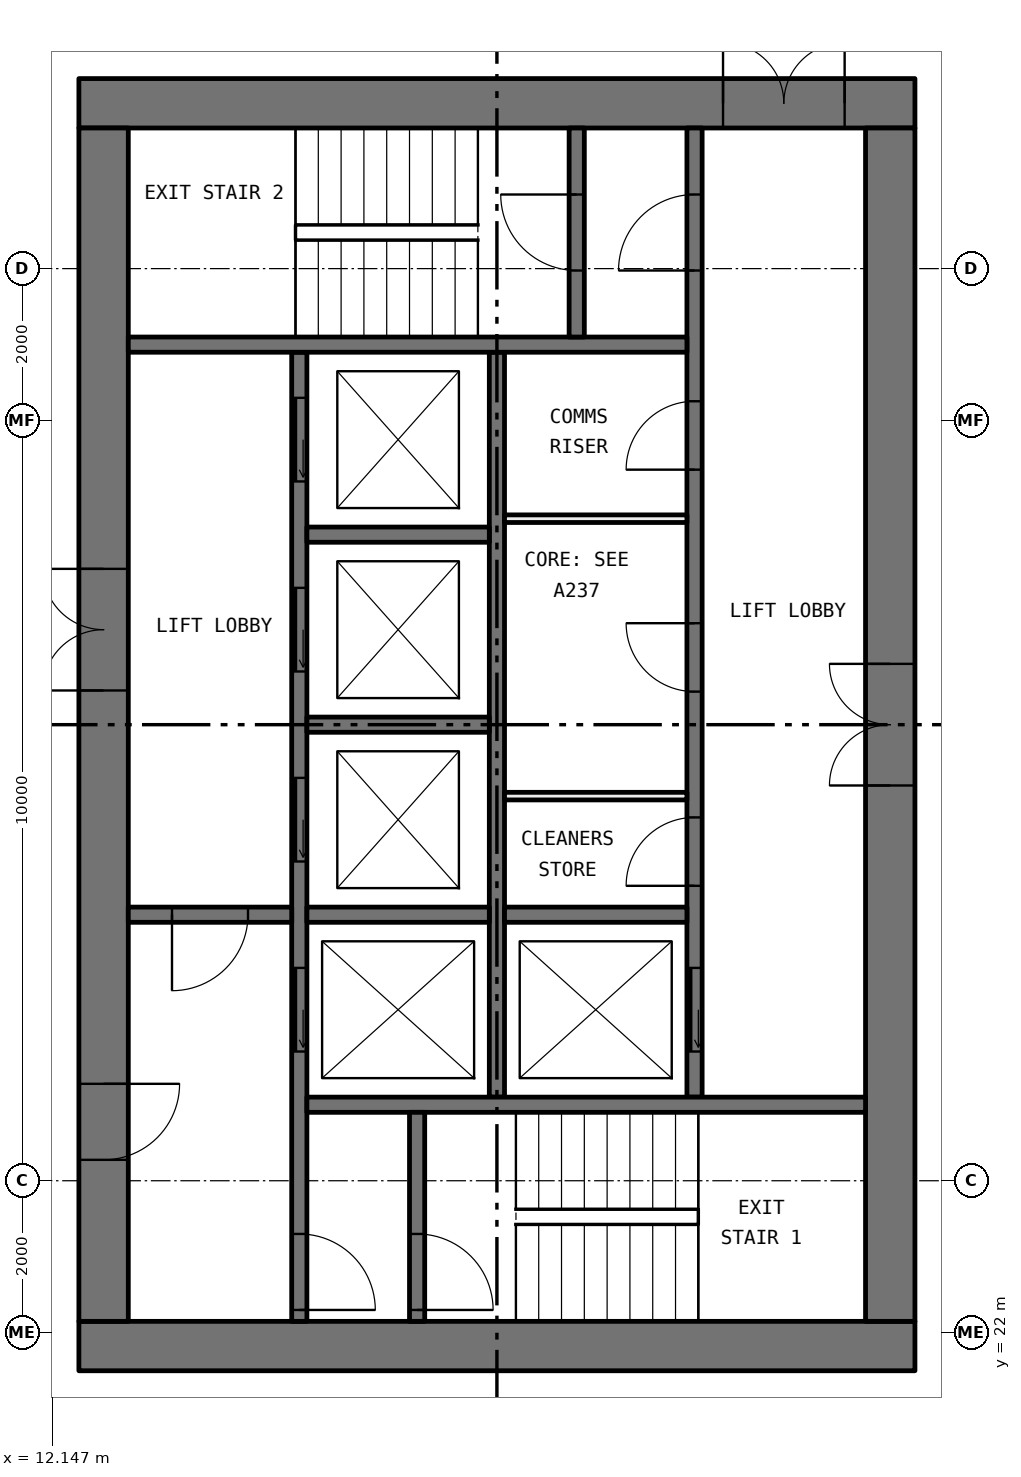
"""IFC4 building model, lengths in metres.
Left out: names, types, materials, properties, quantities, classifications, styles, units other than length and angle.
Written with IfcOpenShell. Run it as: python <this file> out.ifc"""

import sys

from ifc_helpers import new_model, si_unit, direction, frame, frame_2d, origin, place, context, subcontext, project, spatial, rectangle, extrude, element, fill, save


model = new_model("IFC4")
c1 = context("Model", 3, precision=1e-05, world=origin(), true_north=direction((0.0, 1.0)))
c2 = subcontext(c1, "Body", "Model", "MODEL_VIEW")
j1 = project(units=[si_unit("LENGTHUNIT", "METRE"), si_unit("PLANEANGLEUNIT", "RADIAN")], contexts=[c1])
p1 = place(None, origin())
s1 = spatial("IfcSite", under=j1, at=p1, CompositionType="ELEMENT")
p2 = place(p1, origin())
s2 = spatial("IfcBuilding", under=s1, at=p2, CompositionType="ELEMENT")
p3 = place(p2, frame((0.0, 0.0, 138.0)))
s3 = spatial("IfcBuildingStorey", under=s2, at=p3, CompositionType="ELEMENT", Elevation=138.0)
p4 = place(p3, frame((12.5, 21.825, 0.0), z_axis=(0.0, 0.0, 1.0), x_axis=(1.0, 0.0, 0.0)))
e1 = element("IfcWall", 1, at=p4, inside=s3, PredefinedType="SHEAR", context=c2, shape_type="SweptSolid", body=[
    extrude(rectangle(XDim=11.0, YDim=0.65, at=frame_2d((5.5, 0.0))), origin(), (0.0, 0.0, 1.0), 3.05),
])
p5 = place(p3, frame((12.5, 38.175, 0.0), z_axis=(0.0, 0.0, 1.0), x_axis=(1.0, 0.0, 0.0)))
e2 = element("IfcWall", 2, at=p5, inside=s3, PredefinedType="SHEAR", context=c2, shape_type="SweptSolid", body=[
    extrude(rectangle(XDim=11.0, YDim=0.65, at=frame_2d((5.5, 0.0))), origin(), (0.0, 0.0, 1.0), 3.05),
])
p6 = place(p5, frame((8.475, 0.0, 0.0)))
e3 = element("IfcOpeningElement", 3, at=p6, cuts=e2, PredefinedType="OPENING", context=c2, shape_type="SweptSolid", body=[
    extrude(rectangle(XDim=1.6, YDim=2.1, at=frame_2d((0.8, 1.05))), frame((0.0, 0.335, 0.0), z_axis=(0.0, -1.0, 0.0), x_axis=(1.0, 0.0, 0.0)), (0.0, 0.0, 1.0), 0.67),
])
p7 = place(p3, frame((12.825, 22.15, 0.0), z_axis=(0.0, 0.0, 1.0), x_axis=(0.0, 1.0, 0.0)))
e4 = element("IfcWall", 4, at=p7, inside=s3, PredefinedType="SHEAR", context=c2, shape_type="SweptSolid", body=[
    extrude(rectangle(XDim=15.7, YDim=0.65, at=frame_2d((7.85, 0.0))), origin(), (0.0, 0.0, 1.0), 3.05),
])
p8 = place(p7, frame((8.3, 0.0, 0.0)))
e5 = element("IfcOpeningElement", 5, at=p8, cuts=e4, PredefinedType="OPENING", context=c2, shape_type="SweptSolid", body=[
    extrude(rectangle(XDim=1.6, YDim=2.1, at=frame_2d((0.8, 1.05))), frame((0.0, 0.335, 0.0), z_axis=(0.0, -1.0, 0.0), x_axis=(1.0, 0.0, 0.0)), (0.0, 0.0, 1.0), 0.67),
])
p9 = place(p7, frame((2.125, 0.0, 0.0)))
e6 = element("IfcOpeningElement", 6, at=p9, cuts=e4, PredefinedType="OPENING", context=c2, shape_type="SweptSolid", body=[
    extrude(rectangle(XDim=1.0, YDim=2.1, at=frame_2d((0.5, 1.05))), frame((0.0, 0.335, 0.0), z_axis=(0.0, -1.0, 0.0), x_axis=(1.0, 0.0, 0.0)), (0.0, 0.0, 1.0), 0.67),
])
p10 = place(p3, frame((23.175, 22.15, 0.0), z_axis=(0.0, 0.0, 1.0), x_axis=(0.0, 1.0, 0.0)))
e7 = element("IfcWall", 7, at=p10, inside=s3, PredefinedType="SHEAR", context=c2, shape_type="SweptSolid", body=[
    extrude(rectangle(XDim=15.7, YDim=0.65, at=frame_2d((7.85, 0.0))), origin(), (0.0, 0.0, 1.0), 3.05),
])
p11 = place(p10, frame((7.05, 0.0, 0.0)))
e8 = element("IfcOpeningElement", 8, at=p11, cuts=e7, PredefinedType="OPENING", context=c2, shape_type="SweptSolid", body=[
    extrude(rectangle(XDim=1.6, YDim=2.1, at=frame_2d((0.8, 1.05))), frame((0.0, 0.335, 0.0), z_axis=(0.0, -1.0, 0.0), x_axis=(1.0, 0.0, 0.0)), (0.0, 0.0, 1.0), 0.67),
])
p12 = place(p3, frame((15.4, 22.15, 0.0), z_axis=(0.0, 0.0, 1.0), x_axis=(0.0, 1.0, 0.0)))
e9 = element("IfcWall", 9, at=p12, inside=s3, PredefinedType="SOLIDWALL", context=c2, shape_type="SweptSolid", body=[
    extrude(rectangle(XDim=12.75, YDim=0.2, at=frame_2d((6.375, 0.0))), origin(), (0.0, 0.0, 1.0), 3.05),
])
p13 = place(p12, frame((3.55, 0.0, 0.0)))
e10 = element("IfcOpeningElement", 10, at=p13, cuts=e9, PredefinedType="OPENING", context=c2, shape_type="SweptSolid", body=[
    extrude(rectangle(XDim=1.1, YDim=2.1, at=frame_2d((0.55, 1.05))), frame((0.0, 0.11, 0.0), z_axis=(0.0, -1.0, 0.0), x_axis=(1.0, 0.0, 0.0)), (0.0, 0.0, 1.0), 0.22),
])
p14 = place(p12, frame((6.05, 0.0, 0.0)))
e11 = element("IfcOpeningElement", 11, at=p14, cuts=e9, PredefinedType="OPENING", context=c2, shape_type="SweptSolid", body=[
    extrude(rectangle(XDim=1.1, YDim=2.1, at=frame_2d((0.55, 1.05))), frame((0.0, 0.11, 0.0), z_axis=(0.0, -1.0, 0.0), x_axis=(1.0, 0.0, 0.0)), (0.0, 0.0, 1.0), 0.22),
])
p15 = place(p12, frame((8.55, 0.0, 0.0)))
e12 = element("IfcOpeningElement", 12, at=p15, cuts=e9, PredefinedType="OPENING", context=c2, shape_type="SweptSolid", body=[
    extrude(rectangle(XDim=1.1, YDim=2.1, at=frame_2d((0.55, 1.05))), frame((0.0, 0.11, 0.0), z_axis=(0.0, -1.0, 0.0), x_axis=(1.0, 0.0, 0.0)), (0.0, 0.0, 1.0), 0.22),
])
p16 = place(p12, frame((11.05, 0.0, 0.0)))
e13 = element("IfcOpeningElement", 13, at=p16, cuts=e9, PredefinedType="OPENING", context=c2, shape_type="SweptSolid", body=[
    extrude(rectangle(XDim=1.1, YDim=2.1, at=frame_2d((0.55, 1.05))), frame((0.0, 0.11, 0.0), z_axis=(0.0, -1.0, 0.0), x_axis=(1.0, 0.0, 0.0)), (0.0, 0.0, 1.0), 0.22),
])
p17 = place(p12, frame((0.15, 0.0, 0.0)))
e14 = element("IfcOpeningElement", 14, at=p17, cuts=e9, PredefinedType="OPENING", context=c2, shape_type="SweptSolid", body=[
    extrude(rectangle(XDim=1.0, YDim=2.1, at=frame_2d((0.5, 1.05))), frame((0.0, 0.11, 0.0), z_axis=(0.0, -1.0, 0.0), x_axis=(1.0, 0.0, 0.0)), (0.0, 0.0, 1.0), 0.22),
])
p18 = place(p3, frame((20.6, 25.1, 0.0), z_axis=(0.0, 0.0, 1.0), x_axis=(0.0, 1.0, 0.0)))
e15 = element("IfcWall", 15, at=p18, inside=s3, PredefinedType="SOLIDWALL", context=c2, shape_type="SweptSolid", body=[
    extrude(rectangle(XDim=12.75, YDim=0.2, at=frame_2d((6.375, 0.0))), origin(), (0.0, 0.0, 1.0), 3.05),
])
p19 = place(p18, frame((0.6, 0.0, 0.0)))
e16 = element("IfcOpeningElement", 16, at=p19, cuts=e15, PredefinedType="OPENING", context=c2, shape_type="SweptSolid", body=[
    extrude(rectangle(XDim=1.1, YDim=2.1, at=frame_2d((0.55, 1.05))), frame((0.0, 0.11, 0.0), z_axis=(0.0, -1.0, 0.0), x_axis=(1.0, 0.0, 0.0)), (0.0, 0.0, 1.0), 0.22),
])
p20 = place(p18, frame((10.875, 0.0, 0.0)))
e17 = element("IfcOpeningElement", 17, at=p20, cuts=e15, PredefinedType="OPENING", context=c2, shape_type="SweptSolid", body=[
    extrude(rectangle(XDim=1.0, YDim=2.1, at=frame_2d((0.5, 1.05))), frame((0.0, 0.11, 0.0), z_axis=(0.0, -1.0, 0.0), x_axis=(1.0, 0.0, 0.0)), (0.0, 0.0, 1.0), 0.22),
])
p21 = place(p18, frame((2.78, 0.0, 0.0)))
e18 = element("IfcOpeningElement", 18, at=p21, cuts=e15, PredefinedType="OPENING", context=c2, shape_type="SweptSolid", body=[
    extrude(rectangle(XDim=0.9, YDim=2.1, at=frame_2d((0.45, 1.05))), frame((0.0, 0.11, 0.0), z_axis=(0.0, -1.0, 0.0), x_axis=(1.0, 0.0, 0.0)), (0.0, 0.0, 1.0), 0.22),
])
p22 = place(p18, frame((5.335, 0.0, 0.0)))
e19 = element("IfcOpeningElement", 19, at=p22, cuts=e15, PredefinedType="OPENING", context=c2, shape_type="SweptSolid", body=[
    extrude(rectangle(XDim=0.9, YDim=2.1, at=frame_2d((0.45, 1.05))), frame((0.0, 0.11, 0.0), z_axis=(0.0, -1.0, 0.0), x_axis=(1.0, 0.0, 0.0)), (0.0, 0.0, 1.0), 0.22),
])
p23 = place(p18, frame((8.255, 0.0, 0.0)))
e20 = element("IfcOpeningElement", 20, at=p23, cuts=e15, PredefinedType="OPENING", context=c2, shape_type="SweptSolid", body=[
    extrude(rectangle(XDim=0.9, YDim=2.1, at=frame_2d((0.45, 1.05))), frame((0.0, 0.11, 0.0), z_axis=(0.0, -1.0, 0.0), x_axis=(1.0, 0.0, 0.0)), (0.0, 0.0, 1.0), 0.22),
])
p24 = place(p3, frame((18.0, 25.1, 0.0), z_axis=(0.0, 0.0, 1.0), x_axis=(0.0, 1.0, 0.0)))
e21 = element("IfcWall", 21, at=p24, inside=s3, PredefinedType="SOLIDWALL", context=c2, shape_type="SweptSolid", body=[
    extrude(rectangle(XDim=9.8, YDim=0.2, at=frame_2d((4.9, 0.0))), origin(), (0.0, 0.0, 1.0), 3.05),
])
for number, where, z_axis, x_axis in (
    (22, (15.5, 25.0, 0.0), (0.0, 0.0, 1.0), (1.0, 0.0, 0.0)),
    (23, (13.15, 35.0, 0.0), (0.0, 0.0, 1.0), (1.0, 0.0, 0.0)),
):
    element("IfcWall", number, at=place(p3, frame(where, z_axis=z_axis, x_axis=x_axis)), inside=s3, PredefinedType="SOLIDWALL", context=c2, shape_type="SweptSolid", body=[
        extrude(rectangle(XDim=7.35, YDim=0.2, at=frame_2d((3.675, 0.0))), origin(), (0.0, 0.0, 1.0), 3.05),
    ])
p25 = place(p3, frame((13.15, 27.5, 0.0), z_axis=(0.0, 0.0, 1.0), x_axis=(1.0, 0.0, 0.0)))
e24 = element("IfcWall", 24, at=p25, inside=s3, PredefinedType="SOLIDWALL", context=c2, shape_type="SweptSolid", body=[
    extrude(rectangle(XDim=2.15, YDim=0.2, at=frame_2d((1.075, 0.0))), origin(), (0.0, 0.0, 1.0), 3.05),
])
p26 = place(p25, frame((0.575, 0.0, 0.0)))
e25 = element("IfcOpeningElement", 25, at=p26, cuts=e24, PredefinedType="OPENING", context=c2, shape_type="SweptSolid", body=[
    extrude(rectangle(XDim=1.0, YDim=2.1, at=frame_2d((0.5, 1.05))), frame((0.0, 0.11, 0.0), z_axis=(0.0, -1.0, 0.0), x_axis=(1.0, 0.0, 0.0)), (0.0, 0.0, 1.0), 0.22),
])
p27 = place(p3, frame((16.95, 22.15, 0.0), z_axis=(0.0, 0.0, 1.0), x_axis=(0.0, 1.0, 0.0)))
e26 = element("IfcWall", 26, at=p27, inside=s3, PredefinedType="SOLIDWALL", context=c2, shape_type="SweptSolid", body=[
    extrude(rectangle(XDim=2.75, YDim=0.2, at=frame_2d((1.375, 0.0))), origin(), (0.0, 0.0, 1.0), 3.05),
])
p28 = place(p27, frame((0.15, 0.0, 0.0)))
e27 = element("IfcOpeningElement", 27, at=p28, cuts=e26, PredefinedType="OPENING", context=c2, shape_type="SweptSolid", body=[
    extrude(rectangle(XDim=1.0, YDim=2.1, at=frame_2d((0.5, 1.05))), frame((0.0, 0.11, 0.0), z_axis=(0.0, -1.0, 0.0), x_axis=(1.0, 0.0, 0.0)), (0.0, 0.0, 1.0), 0.22),
])
p29 = place(p3, frame((19.05, 35.1, 0.0), z_axis=(0.0, 0.0, 1.0), x_axis=(0.0, 1.0, 0.0)))
e28 = element("IfcWall", 28, at=p29, inside=s3, PredefinedType="SOLIDWALL", context=c2, shape_type="SweptSolid", body=[
    extrude(rectangle(XDim=2.75, YDim=0.2, at=frame_2d((1.375, 0.0))), origin(), (0.0, 0.0, 1.0), 3.05),
])
p30 = place(p29, frame((0.875, 0.0, 0.0)))
e29 = element("IfcOpeningElement", 29, at=p30, cuts=e28, PredefinedType="OPENING", context=c2, shape_type="SweptSolid", body=[
    extrude(rectangle(XDim=1.0, YDim=2.1, at=frame_2d((0.5, 1.05))), frame((0.0, 0.11, 0.0), z_axis=(0.0, -1.0, 0.0), x_axis=(1.0, 0.0, 0.0)), (0.0, 0.0, 1.0), 0.22),
])
for number, where, z_axis, x_axis in (
    (30, (15.5, 27.5, 0.0), (0.0, 0.0, 1.0), (1.0, 0.0, 0.0)),
    (31, (15.5, 30.0, 0.0), (0.0, 0.0, 1.0), (1.0, 0.0, 0.0)),
    (32, (15.5, 32.5, 0.0), (0.0, 0.0, 1.0), (1.0, 0.0, 0.0)),
    (33, (18.1, 27.5, 0.0), (0.0, 0.0, 1.0), (1.0, 0.0, 0.0)),
):
    element("IfcWall", number, at=place(p3, frame(where, z_axis=z_axis, x_axis=x_axis)), inside=s3, PredefinedType="SOLIDWALL", context=c2, shape_type="SweptSolid", body=[
        extrude(rectangle(XDim=2.4, YDim=0.2, at=frame_2d((1.2, 0.0))), origin(), (0.0, 0.0, 1.0), 3.05),
    ])
for number, where, z_axis, x_axis in (
    (34, (18.1, 29.06, 0.0), (0.0, 0.0, 1.0), (1.0, 0.0, 0.0)),
    (35, (18.1, 32.71, 0.0), (0.0, 0.0, 1.0), (1.0, 0.0, 0.0)),
):
    element("IfcWall", number, at=place(p3, frame(where, z_axis=z_axis, x_axis=x_axis)), inside=s3, PredefinedType="PARTITIONING", context=c2, shape_type="SweptSolid", body=[
        extrude(rectangle(XDim=2.4, YDim=0.1, at=frame_2d((1.2, 0.0))), origin(), (0.0, 0.0, 1.0), 3.05),
    ])
p31 = place(p19, origin())
e36 = element("IfcDoor", 36, at=p31, inside=s3, OperationType="SLIDING_TO_LEFT", PredefinedType="DOOR", context=c2, shape_type="SweptSolid", body=[
    extrude(rectangle(XDim=1.1, YDim=2.1, at=frame_2d((0.55, 1.05))), frame((0.0, 0.025, 0.0), z_axis=(0.0, -1.0, 0.0), x_axis=(1.0, 0.0, 0.0)), (0.0, 0.0, 1.0), 0.05),
])
fill(e16, e36)
p32 = place(p13, origin())
e37 = element("IfcDoor", 37, at=p32, inside=s3, OperationType="SLIDING_TO_LEFT", PredefinedType="DOOR", context=c2, shape_type="SweptSolid", body=[
    extrude(rectangle(XDim=1.1, YDim=2.1, at=frame_2d((0.55, 1.05))), frame((0.0, 0.025, 0.0), z_axis=(0.0, -1.0, 0.0), x_axis=(1.0, 0.0, 0.0)), (0.0, 0.0, 1.0), 0.05),
])
fill(e10, e37)
p33 = place(p14, origin())
e38 = element("IfcDoor", 38, at=p33, inside=s3, OperationType="SLIDING_TO_LEFT", PredefinedType="DOOR", context=c2, shape_type="SweptSolid", body=[
    extrude(rectangle(XDim=1.1, YDim=2.1, at=frame_2d((0.55, 1.05))), frame((0.0, 0.025, 0.0), z_axis=(0.0, -1.0, 0.0), x_axis=(1.0, 0.0, 0.0)), (0.0, 0.0, 1.0), 0.05),
])
fill(e11, e38)
p34 = place(p15, origin())
e39 = element("IfcDoor", 39, at=p34, inside=s3, OperationType="SLIDING_TO_LEFT", PredefinedType="DOOR", context=c2, shape_type="SweptSolid", body=[
    extrude(rectangle(XDim=1.1, YDim=2.1, at=frame_2d((0.55, 1.05))), frame((0.0, 0.025, 0.0), z_axis=(0.0, -1.0, 0.0), x_axis=(1.0, 0.0, 0.0)), (0.0, 0.0, 1.0), 0.05),
])
fill(e12, e39)
p35 = place(p16, origin())
e40 = element("IfcDoor", 40, at=p35, inside=s3, OperationType="SLIDING_TO_LEFT", PredefinedType="DOOR", context=c2, shape_type="SweptSolid", body=[
    extrude(rectangle(XDim=1.1, YDim=2.1, at=frame_2d((0.55, 1.05))), frame((0.0, 0.025, 0.0), z_axis=(0.0, -1.0, 0.0), x_axis=(1.0, 0.0, 0.0)), (0.0, 0.0, 1.0), 0.05),
])
fill(e13, e40)
p36 = place(p28, frame((1.0, 0.0, 0.0), x_axis=(-1.0, 0.0, 0.0)))
e41 = element("IfcDoor", 41, at=p36, inside=s3, OperationType="SINGLE_SWING_LEFT", PredefinedType="DOOR", context=c2, shape_type="SweptSolid", body=[
    extrude(rectangle(XDim=1.0, YDim=2.1, at=frame_2d((0.5, 1.05))), frame((0.0, 0.025, 0.0), z_axis=(0.0, -1.0, 0.0), x_axis=(1.0, 0.0, 0.0)), (0.0, 0.0, 1.0), 0.05),
])
fill(e27, e41)
p37 = place(p17, frame((1.0, 0.0, 0.0), x_axis=(-1.0, 0.0, 0.0)))
e42 = element("IfcDoor", 42, at=p37, inside=s3, OperationType="SINGLE_SWING_LEFT", PredefinedType="DOOR", context=c2, shape_type="SweptSolid", body=[
    extrude(rectangle(XDim=1.0, YDim=2.1, at=frame_2d((0.5, 1.05))), frame((0.0, 0.025, 0.0), z_axis=(0.0, -1.0, 0.0), x_axis=(1.0, 0.0, 0.0)), (0.0, 0.0, 1.0), 0.05),
])
fill(e14, e42)
p38 = place(p20, origin())
e43 = element("IfcDoor", 43, at=p38, inside=s3, OperationType="SINGLE_SWING_RIGHT", PredefinedType="DOOR", context=c2, shape_type="SweptSolid", body=[
    extrude(rectangle(XDim=1.0, YDim=2.1, at=frame_2d((0.5, 1.05))), frame((0.0, 0.025, 0.0), z_axis=(0.0, -1.0, 0.0), x_axis=(1.0, 0.0, 0.0)), (0.0, 0.0, 1.0), 0.05),
])
fill(e17, e43)
p39 = place(p30, origin())
e44 = element("IfcDoor", 44, at=p39, inside=s3, OperationType="SINGLE_SWING_LEFT", PredefinedType="DOOR", context=c2, shape_type="SweptSolid", body=[
    extrude(rectangle(XDim=1.0, YDim=2.1, at=frame_2d((0.5, 1.05))), frame((0.0, 0.025, 0.0), z_axis=(0.0, -1.0, 0.0), x_axis=(1.0, 0.0, 0.0)), (0.0, 0.0, 1.0), 0.05),
])
fill(e29, e44)
p40 = place(p26, frame((1.0, 0.0, 0.0), x_axis=(-1.0, 0.0, 0.0)))
e45 = element("IfcDoor", 45, at=p40, inside=s3, OperationType="SINGLE_SWING_LEFT", PredefinedType="DOOR", context=c2, shape_type="SweptSolid", body=[
    extrude(rectangle(XDim=1.0, YDim=2.1, at=frame_2d((0.5, 1.05))), frame((0.0, 0.025, 0.0), z_axis=(0.0, -1.0, 0.0), x_axis=(1.0, 0.0, 0.0)), (0.0, 0.0, 1.0), 0.05),
])
fill(e25, e45)
p41 = place(p8, origin())
e46 = element("IfcDoor", 46, at=p41, inside=s3, OperationType="DOUBLE_DOOR_SINGLE_SWING", PredefinedType="DOOR", context=c2, shape_type="SweptSolid", body=[
    extrude(rectangle(XDim=1.6, YDim=2.1, at=frame_2d((0.8, 1.05))), frame((0.0, 0.025, 0.0), z_axis=(0.0, -1.0, 0.0), x_axis=(1.0, 0.0, 0.0)), (0.0, 0.0, 1.0), 0.05),
])
fill(e5, e46)
p42 = place(p9, frame((1.0, 0.0, 0.0), x_axis=(-1.0, 0.0, 0.0)))
e47 = element("IfcDoor", 47, at=p42, inside=s3, OperationType="SINGLE_SWING_RIGHT", PredefinedType="DOOR", context=c2, shape_type="SweptSolid", body=[
    extrude(rectangle(XDim=1.0, YDim=2.1, at=frame_2d((0.5, 1.05))), frame((0.0, 0.025, 0.0), z_axis=(0.0, -1.0, 0.0), x_axis=(1.0, 0.0, 0.0)), (0.0, 0.0, 1.0), 0.05),
])
fill(e6, e47)
p43 = place(p6, origin())
e48 = element("IfcDoor", 48, at=p43, inside=s3, OperationType="DOUBLE_DOOR_SINGLE_SWING", PredefinedType="DOOR", context=c2, shape_type="SweptSolid", body=[
    extrude(rectangle(XDim=1.6, YDim=2.1, at=frame_2d((0.8, 1.05))), frame((0.0, 0.025, 0.0), z_axis=(0.0, -1.0, 0.0), x_axis=(1.0, 0.0, 0.0)), (0.0, 0.0, 1.0), 0.05),
])
fill(e3, e48)
p44 = place(p11, origin())
e49 = element("IfcDoor", 49, at=p44, inside=s3, OperationType="DOUBLE_DOOR_SINGLE_SWING", PredefinedType="DOOR", context=c2, shape_type="SweptSolid", body=[
    extrude(rectangle(XDim=1.6, YDim=2.1, at=frame_2d((0.8, 1.05))), frame((0.0, 0.025, 0.0), z_axis=(0.0, -1.0, 0.0), x_axis=(1.0, 0.0, 0.0)), (0.0, 0.0, 1.0), 0.05),
])
fill(e8, e49)
p45 = place(p21, origin())
e50 = element("IfcDoor", 50, at=p45, inside=s3, OperationType="SINGLE_SWING_RIGHT", PredefinedType="DOOR", context=c2, shape_type="SweptSolid", body=[
    extrude(rectangle(XDim=0.9, YDim=2.1, at=frame_2d((0.45, 1.05))), frame((0.0, 0.025, 0.0), z_axis=(0.0, -1.0, 0.0), x_axis=(1.0, 0.0, 0.0)), (0.0, 0.0, 1.0), 0.05),
])
fill(e18, e50)
p46 = place(p22, origin())
e51 = element("IfcDoor", 51, at=p46, inside=s3, OperationType="SINGLE_SWING_LEFT", PredefinedType="DOOR", context=c2, shape_type="SweptSolid", body=[
    extrude(rectangle(XDim=0.9, YDim=2.1, at=frame_2d((0.45, 1.05))), frame((0.0, 0.025, 0.0), z_axis=(0.0, -1.0, 0.0), x_axis=(1.0, 0.0, 0.0)), (0.0, 0.0, 1.0), 0.05),
])
fill(e19, e51)
p47 = place(p23, origin())
e52 = element("IfcDoor", 52, at=p47, inside=s3, OperationType="SINGLE_SWING_RIGHT", PredefinedType="DOOR", context=c2, shape_type="SweptSolid", body=[
    extrude(rectangle(XDim=0.9, YDim=2.1, at=frame_2d((0.45, 1.05))), frame((0.0, 0.025, 0.0), z_axis=(0.0, -1.0, 0.0), x_axis=(1.0, 0.0, 0.0)), (0.0, 0.0, 1.0), 0.05),
])
fill(e20, e52)
save(model, sys.argv[1])
